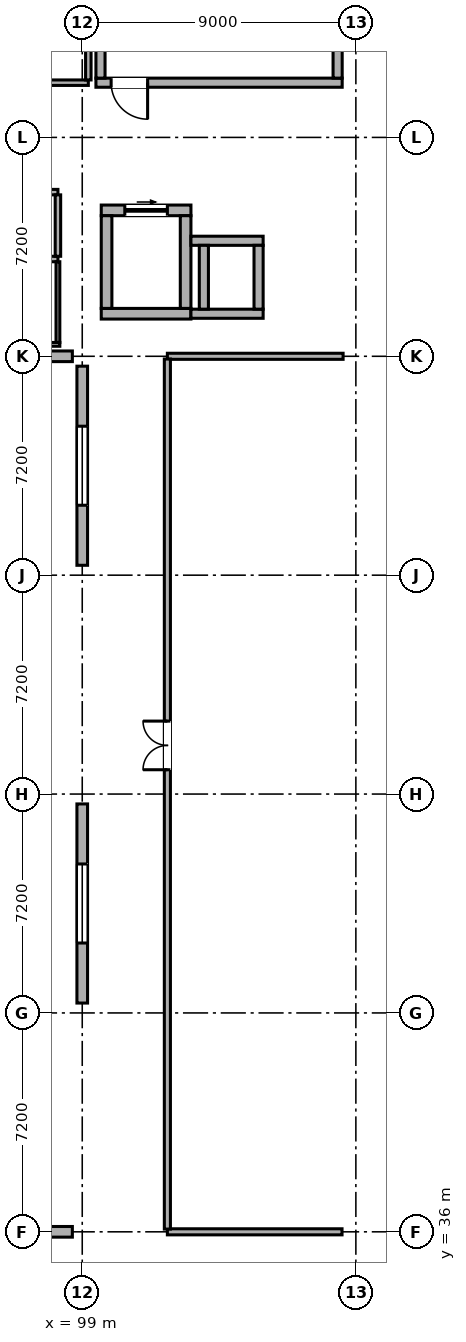
"""IFC4 building model, lengths in metres.
Left out: names, types, materials, properties, quantities, classifications, styles, units other than length and angle.
Written with IfcOpenShell. Run it as: python <this file> out.ifc"""

import sys

from ifc_helpers import new_model, si_unit, direction, frame, frame_2d, origin, origin_2d, place, context, subcontext, project, spatial, rectangle, hollow_rectangle, extrude, element, fill, save


model = new_model("IFC4")
c1 = context("Model", 3, precision=1e-05, world=origin(), true_north=direction((0.0, 1.0)))
c2 = subcontext(c1, "Body", "Model", "MODEL_VIEW")
j1 = project(units=[si_unit("LENGTHUNIT", "METRE"), si_unit("PLANEANGLEUNIT", "RADIAN")], contexts=[c1])
p1 = place(None, origin())
s1 = spatial("IfcSite", under=j1, at=p1, CompositionType="ELEMENT")
p2 = place(p1, origin())
s2 = spatial("IfcBuilding", under=s1, at=p2, CompositionType="ELEMENT")
p3 = place(p2, origin())
s3 = spatial("IfcBuildingStorey", under=s2, at=p3, CompositionType="ELEMENT", Elevation=0.0)
for number, where, z_axis, x_axis in (
    (1, (99.0, 36.0, 0.0), (0.0, 0.0, 1.0), (1.0, 0.0, 0.0)),
    (2, (99.0, 43.2, 0.0), (0.0, 0.0, 1.0), (1.0, 0.0, 0.0)),
    (3, (99.0, 50.4, 0.0), (0.0, 0.0, 1.0), (1.0, 0.0, 0.0)),
    (4, (99.0, 57.6, 0.0), (0.0, 0.0, 1.0), (1.0, 0.0, 0.0)),
    (5, (99.0, 64.8, 0.0), (0.0, 0.0, 1.0), (1.0, 0.0, 0.0)),
    (6, (99.0, 72.0, 0.0), (0.0, 0.0, 1.0), (1.0, 0.0, 0.0)),
):
    element("IfcColumn", number, at=place(p3, frame(where, z_axis=z_axis, x_axis=x_axis)), inside=s3, PredefinedType="COLUMN", context=c2, shape_type="SweptSolid", body=[
        extrude(hollow_rectangle(XDim=0.65, YDim=0.65, WallThickness=0.025, at=origin_2d()), origin(), (0.0, 0.0, 1.0), 4.8),
    ])
for number, where, z_axis, x_axis in (
    (7, (108.0, 36.0, 0.0), (0.0, 0.0, 1.0), (1.0, 0.0, 0.0)),
    (8, (108.0, 43.2, 0.0), (0.0, 0.0, 1.0), (1.0, 0.0, 0.0)),
    (9, (108.0, 50.4, 0.0), (0.0, 0.0, 1.0), (1.0, 0.0, 0.0)),
    (10, (108.0, 57.6, 0.0), (0.0, 0.0, 1.0), (1.0, 0.0, 0.0)),
    (11, (108.0, 64.8, 0.0), (0.0, 0.0, 1.0), (1.0, 0.0, 0.0)),
    (12, (108.0, 72.0, 0.0), (0.0, 0.0, 1.0), (1.0, 0.0, 0.0)),
):
    element("IfcColumn", number, at=place(p3, frame(where, z_axis=z_axis, x_axis=x_axis)), inside=s3, PredefinedType="COLUMN", context=c2, shape_type="SweptSolid", body=[
        extrude(hollow_rectangle(XDim=0.5, YDim=0.5, WallThickness=0.022, at=origin_2d()), origin(), (0.0, 0.0, 1.0), 4.8),
    ])
p4 = place(p3, frame((98.675, 36.0, 0.0), z_axis=(0.0, 0.0, 1.0), x_axis=(-1.0, 0.0, 0.0)))
e13 = element("IfcWall", 13, at=p4, inside=s3, PredefinedType="STANDARD", context=c2, shape_type="SweptSolid", body=[
    extrude(rectangle(XDim=8.35, YDim=0.35, at=frame_2d((4.175, 0.0))), origin(), (0.0, 0.0, 1.0), 4.055),
])
p5 = place(p4, frame((2.875, 0.0, 0.85)))
e14 = element("IfcOpeningElement", 14, at=p5, cuts=e13, PredefinedType="OPENING", context=c2, shape_type="SweptSolid", body=[
    extrude(rectangle(XDim=2.6, YDim=1.6, at=frame_2d((1.3, 0.8))), frame((0.0, 0.187, 0.0), z_axis=(0.0, -1.0, 0.0), x_axis=(1.0, 0.0, 0.0)), (0.0, 0.0, 1.0), 0.374),
])
p6 = place(p3, frame((90.325, 64.8, 0.0), z_axis=(0.0, 0.0, 1.0), x_axis=(1.0, 0.0, 0.0)))
e15 = element("IfcWall", 15, at=p6, inside=s3, PredefinedType="STANDARD", context=c2, shape_type="SweptSolid", body=[
    extrude(rectangle(XDim=8.35, YDim=0.35, at=frame_2d((4.175, 0.0))), origin(), (0.0, 0.0, 1.0), 4.055),
])
p7 = place(p6, frame((2.875, 0.0, 0.85)))
e16 = element("IfcOpeningElement", 16, at=p7, cuts=e15, PredefinedType="OPENING", context=c2, shape_type="SweptSolid", body=[
    extrude(rectangle(XDim=2.6, YDim=1.6, at=frame_2d((1.3, 0.8))), frame((0.0, 0.187, 0.0), z_axis=(0.0, -1.0, 0.0), x_axis=(1.0, 0.0, 0.0)), (0.0, 0.0, 1.0), 0.374),
])
p8 = place(p3, frame((99.0, 43.525, 0.0), z_axis=(0.0, 0.0, 1.0), x_axis=(0.0, 1.0, 0.0)))
e17 = element("IfcWall", 17, at=p8, inside=s3, PredefinedType="STANDARD", context=c2, shape_type="SweptSolid", body=[
    extrude(rectangle(XDim=6.55, YDim=0.35, at=frame_2d((3.275, 0.0))), origin(), (0.0, 0.0, 1.0), 4.055),
])
p9 = place(p8, frame((1.975, 0.0, 0.85)))
e18 = element("IfcOpeningElement", 18, at=p9, cuts=e17, PredefinedType="OPENING", context=c2, shape_type="SweptSolid", body=[
    extrude(rectangle(XDim=2.6, YDim=1.6, at=frame_2d((1.3, 0.8))), frame((0.0, 0.187, 0.0), z_axis=(0.0, -1.0, 0.0), x_axis=(1.0, 0.0, 0.0)), (0.0, 0.0, 1.0), 0.374),
])
p10 = place(p3, frame((99.0, 57.925, 0.0), z_axis=(0.0, 0.0, 1.0), x_axis=(0.0, 1.0, 0.0)))
e19 = element("IfcWall", 19, at=p10, inside=s3, PredefinedType="STANDARD", context=c2, shape_type="SweptSolid", body=[
    extrude(rectangle(XDim=6.55, YDim=0.35, at=frame_2d((3.275, 0.0))), origin(), (0.0, 0.0, 1.0), 4.055),
])
p11 = place(p10, frame((1.975, 0.0, 0.85)))
e20 = element("IfcOpeningElement", 20, at=p11, cuts=e19, PredefinedType="OPENING", context=c2, shape_type="SweptSolid", body=[
    extrude(rectangle(XDim=2.6, YDim=1.6, at=frame_2d((1.3, 0.8))), frame((0.0, 0.187, 0.0), z_axis=(0.0, -1.0, 0.0), x_axis=(1.0, 0.0, 0.0)), (0.0, 0.0, 1.0), 0.374),
])
p12 = place(p3, frame((99.45, 73.8, 0.0), z_axis=(0.0, 0.0, 1.0), x_axis=(1.0, 0.0, 0.0)))
e21 = element("IfcWall", 21, at=p12, inside=s3, PredefinedType="SHEAR", context=c2, shape_type="SweptSolid", body=[
    extrude(rectangle(XDim=8.1, YDim=0.3, at=frame_2d((4.05, 0.0))), origin(), (0.0, 0.0, 1.0), 4.555),
])
p13 = place(p12, frame((0.5, 0.0, 0.0)))
e22 = element("IfcOpeningElement", 22, at=p13, cuts=e21, PredefinedType="OPENING", context=c2, shape_type="SweptSolid", body=[
    extrude(rectangle(XDim=1.2, YDim=2.1, at=frame_2d((0.6, 1.05))), frame((0.0, 0.162, 0.0), z_axis=(0.0, -1.0, 0.0), x_axis=(1.0, 0.0, 0.0)), (0.0, 0.0, 1.0), 0.324),
])
for number, where, z_axis, x_axis in (
    (23, (99.6, 73.95, 0.0), (0.0, 0.0, 1.0), (0.0, 1.0, 0.0)),
    (24, (107.4, 73.95, 0.0), (0.0, 0.0, 1.0), (0.0, 1.0, 0.0)),
):
    element("IfcWall", number, at=place(p3, frame(where, z_axis=z_axis, x_axis=x_axis)), inside=s3, PredefinedType="SHEAR", context=c2, shape_type="SweptSolid", body=[
        extrude(rectangle(XDim=3.8, YDim=0.3, at=frame_2d((1.9, 0.0))), origin(), (0.0, 0.0, 1.0), 4.555),
    ])
p14 = place(p3, frame((99.625, 66.2, 0.0), z_axis=(0.0, 0.0, 1.0), x_axis=(1.0, 0.0, 0.0)))
e25 = element("IfcWall", 25, at=p14, inside=s3, PredefinedType="SHEAR", context=c2, shape_type="SweptSolid", body=[
    extrude(rectangle(XDim=2.95, YDim=0.35, at=frame_2d((1.475, 0.0))), origin(), (0.0, 0.0, 1.0), 4.555),
])
p15 = place(p3, frame((99.625, 69.6, 0.0), z_axis=(0.0, 0.0, 1.0), x_axis=(1.0, 0.0, 0.0)))
e26 = element("IfcWall", 26, at=p15, inside=s3, PredefinedType="SHEAR", context=c2, shape_type="SweptSolid", body=[
    extrude(rectangle(XDim=2.95, YDim=0.35, at=frame_2d((1.475, 0.0))), origin(), (0.0, 0.0, 1.0), 4.555),
])
p16 = place(p15, frame((0.775, 0.0, 0.0)))
e27 = element("IfcOpeningElement", 27, at=p16, cuts=e26, PredefinedType="OPENING", context=c2, shape_type="SweptSolid", body=[
    extrude(rectangle(XDim=1.4, YDim=2.15, at=frame_2d((0.7, 1.075))), frame((0.0, 0.187, 0.0), z_axis=(0.0, -1.0, 0.0), x_axis=(1.0, 0.0, 0.0)), (0.0, 0.0, 1.0), 0.374),
])
for number, where, z_axis, x_axis in (
    (28, (99.8, 66.375, 0.0), (0.0, 0.0, 1.0), (0.0, 1.0, 0.0)),
    (29, (102.4, 66.375, 0.0), (0.0, 0.0, 1.0), (0.0, 1.0, 0.0)),
):
    element("IfcWall", number, at=place(p3, frame(where, z_axis=z_axis, x_axis=x_axis)), inside=s3, PredefinedType="SHEAR", context=c2, shape_type="SweptSolid", body=[
        extrude(rectangle(XDim=3.05, YDim=0.35, at=frame_2d((1.525, 0.0))), origin(), (0.0, 0.0, 1.0), 4.555),
    ])
for number, where, z_axis, x_axis in (
    (30, (102.575, 66.2, 0.0), (0.0, 0.0, 1.0), (1.0, 0.0, 0.0)),
    (31, (102.575, 68.6, 0.0), (0.0, 0.0, 1.0), (1.0, 0.0, 0.0)),
):
    element("IfcWall", number, at=place(p3, frame(where, z_axis=z_axis, x_axis=x_axis)), inside=s3, PredefinedType="SHEAR", context=c2, shape_type="SweptSolid", body=[
        extrude(rectangle(XDim=2.375, YDim=0.3, at=frame_2d((1.188, 0.0))), origin(), (0.0, 0.0, 1.0), 4.555),
    ])
for number, where, z_axis, x_axis in (
    (32, (103.0, 66.35, 0.0), (0.0, 0.0, 1.0), (0.0, 1.0, 0.0)),
    (33, (104.8, 66.35, 0.0), (0.0, 0.0, 1.0), (0.0, 1.0, 0.0)),
):
    element("IfcWall", number, at=place(p3, frame(where, z_axis=z_axis, x_axis=x_axis)), inside=s3, PredefinedType="SHEAR", context=c2, shape_type="SweptSolid", body=[
        extrude(rectangle(XDim=2.1, YDim=0.3, at=frame_2d((1.05, 0.0))), origin(), (0.0, 0.0, 1.0), 4.555),
    ])
p17 = place(p3, frame((91.137, 65.192, 0.0), z_axis=(0.0, 0.0, 1.0), x_axis=(1.0, 0.0, 0.0)))
e34 = element("IfcWall", 34, at=p17, inside=s3, PredefinedType="PARTITIONING", context=c2, shape_type="SweptSolid", body=[
    extrude(rectangle(XDim=7.125, YDim=0.125, at=frame_2d((3.562, 0.0))), origin(), (0.0, 0.0, 1.0), 4.555),
])
p18 = place(p3, frame((91.2, 68.0, 0.0), z_axis=(0.0, 0.0, 1.0), x_axis=(1.0, 0.0, 0.0)))
e35 = element("IfcWall", 35, at=p18, inside=s3, PredefinedType="PARTITIONING", context=c2, shape_type="SweptSolid", body=[
    extrude(rectangle(XDim=7.0, YDim=0.18, at=frame_2d((3.5, 0.0))), origin(), (0.0, 0.0, 1.0), 4.555),
])
p19 = place(p18, frame((0.675, 0.0, 0.0)))
e36 = element("IfcOpeningElement", 36, at=p19, cuts=e35, PredefinedType="OPENING", context=c2, shape_type="SweptSolid", body=[
    extrude(rectangle(XDim=1.05, YDim=2.1, at=frame_2d((0.525, 1.05))), frame((0.0, 0.102, 0.0), z_axis=(0.0, -1.0, 0.0), x_axis=(1.0, 0.0, 0.0)), (0.0, 0.0, 1.0), 0.204),
])
p20 = place(p18, frame((3.11, 0.0, 0.0)))
e37 = element("IfcOpeningElement", 37, at=p20, cuts=e35, PredefinedType="OPENING", context=c2, shape_type="SweptSolid", body=[
    extrude(rectangle(XDim=0.98, YDim=2.02, at=frame_2d((0.49, 1.01))), frame((0.0, 0.102, 0.0), z_axis=(0.0, -1.0, 0.0), x_axis=(1.0, 0.0, 0.0)), (0.0, 0.0, 1.0), 0.204),
])
p21 = place(p18, frame((5.34, 0.0, 0.0)))
e38 = element("IfcOpeningElement", 38, at=p21, cuts=e35, PredefinedType="OPENING", context=c2, shape_type="SweptSolid", body=[
    extrude(rectangle(XDim=1.12, YDim=2.08, at=frame_2d((0.56, 1.04))), frame((0.0, 0.102, 0.0), z_axis=(0.0, -1.0, 0.0), x_axis=(1.0, 0.0, 0.0)), (0.0, 0.0, 1.0), 0.204),
])
p22 = place(p3, frame((91.2, 70.2, 0.0), z_axis=(0.0, 0.0, 1.0), x_axis=(1.0, 0.0, 0.0)))
e39 = element("IfcWall", 39, at=p22, inside=s3, PredefinedType="PARTITIONING", context=c2, shape_type="SweptSolid", body=[
    extrude(rectangle(XDim=7.0, YDim=0.18, at=frame_2d((3.5, 0.0))), origin(), (0.0, 0.0, 1.0), 4.555),
])
p23 = place(p22, frame((3.01, 0.0, 0.0)))
e40 = element("IfcOpeningElement", 40, at=p23, cuts=e39, PredefinedType="OPENING", context=c2, shape_type="SweptSolid", body=[
    extrude(rectangle(XDim=0.98, YDim=2.02, at=frame_2d((0.49, 1.01))), frame((0.0, 0.102, 0.0), z_axis=(0.0, -1.0, 0.0), x_axis=(1.0, 0.0, 0.0)), (0.0, 0.0, 1.0), 0.204),
])
p24 = place(p3, frame((98.2, 68.09, 0.0), z_axis=(0.0, 0.0, 1.0), x_axis=(0.0, 1.0, 0.0)))
e41 = element("IfcWall", 41, at=p24, inside=s3, PredefinedType="PARTITIONING", context=c2, shape_type="SweptSolid", body=[
    extrude(rectangle(XDim=2.02, YDim=0.18, at=frame_2d((1.01, 0.0))), origin(), (0.0, 0.0, 1.0), 4.555),
])
p25 = place(p3, frame((98.2, 65.255, 0.0), z_axis=(0.0, 0.0, 1.0), x_axis=(0.0, 1.0, 0.0)))
e42 = element("IfcWall", 42, at=p25, inside=s3, PredefinedType="PARTITIONING", context=c2, shape_type="SweptSolid", body=[
    extrude(rectangle(XDim=2.655, YDim=0.125, at=frame_2d((1.328, 0.0))), origin(), (0.0, 0.0, 1.0), 4.555),
])
p26 = place(p3, frame((101.8, 36.0, 0.0), z_axis=(0.0, 0.0, 1.0), x_axis=(1.0, 0.0, 0.0)))
e43 = element("IfcWall", 43, at=p26, inside=s3, PredefinedType="PARTITIONING", context=c2, shape_type="SweptSolid", body=[
    extrude(rectangle(XDim=5.745, YDim=0.2, at=frame_2d((2.873, 0.0))), origin(), (0.0, 0.0, 1.0), 3.835),
])
p27 = place(p3, frame((101.8, 64.8, 0.0), z_axis=(0.0, 0.0, 1.0), x_axis=(1.0, 0.0, 0.0)))
e44 = element("IfcWall", 44, at=p27, inside=s3, PredefinedType="PARTITIONING", context=c2, shape_type="SweptSolid", body=[
    extrude(rectangle(XDim=5.78, YDim=0.2, at=frame_2d((2.89, 0.0))), origin(), (0.0, 0.0, 1.0), 3.835),
])
p28 = place(p3, frame((101.8, 36.09, 0.0), z_axis=(0.0, 0.0, 1.0), x_axis=(0.0, 1.0, 0.0)))
e45 = element("IfcWall", 45, at=p28, inside=s3, PredefinedType="PARTITIONING", context=c2, shape_type="SweptSolid", body=[
    extrude(rectangle(XDim=28.62, YDim=0.2, at=frame_2d((14.31, 0.0))), origin(), (0.0, 0.0, 1.0), 4.555),
])
p29 = place(p28, frame((15.11, 0.0, 0.0)))
e46 = element("IfcOpeningElement", 46, at=p29, cuts=e45, PredefinedType="OPENING", context=c2, shape_type="SweptSolid", body=[
    extrude(rectangle(XDim=1.6, YDim=2.12, at=frame_2d((0.8, 1.06))), frame((0.0, 0.112, 0.0), z_axis=(0.0, -1.0, 0.0), x_axis=(1.0, 0.0, 0.0)), (0.0, 0.0, 1.0), 0.224),
])
p30 = place(p3, frame((62.8, 73.8, 0.0), z_axis=(0.0, 0.0, 1.0), x_axis=(1.0, 0.0, 0.0)))
e47 = element("IfcWall", 47, at=p30, inside=s3, PredefinedType="PARTITIONING", context=c2, shape_type="SweptSolid", body=[
    extrude(rectangle(XDim=36.4, YDim=0.18, at=frame_2d((18.2, 0.0))), origin(), (0.0, 0.0, 1.0), 4.555),
])
p31 = place(p30, frame((12.775, 0.0, 0.0)))
e48 = element("IfcOpeningElement", 48, at=p31, cuts=e47, PredefinedType="OPENING", context=c2, shape_type="SweptSolid", body=[
    extrude(rectangle(XDim=1.85, YDim=2.12, at=frame_2d((0.925, 1.06))), frame((0.0, 0.102, 0.0), z_axis=(0.0, -1.0, 0.0), x_axis=(1.0, 0.0, 0.0)), (0.0, 0.0, 1.0), 0.204),
])
p32 = place(p3, frame((99.2, 73.89, 0.0), z_axis=(0.0, 0.0, 1.0), x_axis=(0.0, 1.0, 0.0)))
e49 = element("IfcWall", 49, at=p32, inside=s3, PredefinedType="PARTITIONING", context=c2, shape_type="SweptSolid", body=[
    extrude(rectangle(XDim=11.42, YDim=0.18, at=frame_2d((5.71, 0.0))), origin(), (0.0, 0.0, 1.0), 3.835),
])
p33 = place(p9, origin())
e50 = element("IfcWindow", 50, at=p33, inside=s3, PartitioningType="DOUBLE_PANEL_VERTICAL", PredefinedType="WINDOW", context=c2, shape_type="SweptSolid", body=[
    extrude(rectangle(XDim=2.6, YDim=1.6, at=frame_2d((1.3, 0.8))), frame((0.0, 0.03, 0.0), z_axis=(0.0, -1.0, 0.0), x_axis=(1.0, 0.0, 0.0)), (0.0, 0.0, 1.0), 0.06),
])
fill(e18, e50)
p34 = place(p11, origin())
e51 = element("IfcWindow", 51, at=p34, inside=s3, PartitioningType="DOUBLE_PANEL_VERTICAL", PredefinedType="WINDOW", context=c2, shape_type="SweptSolid", body=[
    extrude(rectangle(XDim=2.6, YDim=1.6, at=frame_2d((1.3, 0.8))), frame((0.0, 0.03, 0.0), z_axis=(0.0, -1.0, 0.0), x_axis=(1.0, 0.0, 0.0)), (0.0, 0.0, 1.0), 0.06),
])
fill(e20, e51)
p35 = place(p13, frame((1.2, 0.0, 0.0), z_axis=(0.0, 0.0, 1.0), x_axis=(-1.0, 0.0, 0.0)))
e52 = element("IfcDoor", 52, at=p35, inside=s3, OperationType="SINGLE_SWING_LEFT", PredefinedType="DOOR", context=c2, shape_type="SweptSolid", body=[
    extrude(rectangle(XDim=1.2, YDim=2.1, at=frame_2d((0.6, 1.05))), frame((0.0, 0.025, 0.0), z_axis=(0.0, -1.0, 0.0), x_axis=(1.0, 0.0, 0.0)), (0.0, 0.0, 1.0), 0.05),
])
fill(e22, e52)
p36 = place(p16, origin())
e53 = element("IfcDoor", 53, at=p36, inside=s3, OperationType="SLIDING_TO_RIGHT", PredefinedType="DOOR", context=c2, shape_type="SweptSolid", body=[
    extrude(rectangle(XDim=1.4, YDim=2.15, at=frame_2d((0.7, 1.075))), frame((0.0, 0.025, 0.0), z_axis=(0.0, -1.0, 0.0), x_axis=(1.0, 0.0, 0.0)), (0.0, 0.0, 1.0), 0.05),
])
fill(e27, e53)
p37 = place(p29, origin())
e54 = element("IfcDoor", 54, at=p37, inside=s3, OperationType="DOUBLE_DOOR_SINGLE_SWING", PredefinedType="DOOR", context=c2, shape_type="SweptSolid", body=[
    extrude(rectangle(XDim=1.6, YDim=2.12, at=frame_2d((0.8, 1.06))), frame((0.0, 0.025, 0.0), z_axis=(0.0, -1.0, 0.0), x_axis=(1.0, 0.0, 0.0)), (0.0, 0.0, 1.0), 0.05),
])
fill(e46, e54)
save(model, sys.argv[1])
